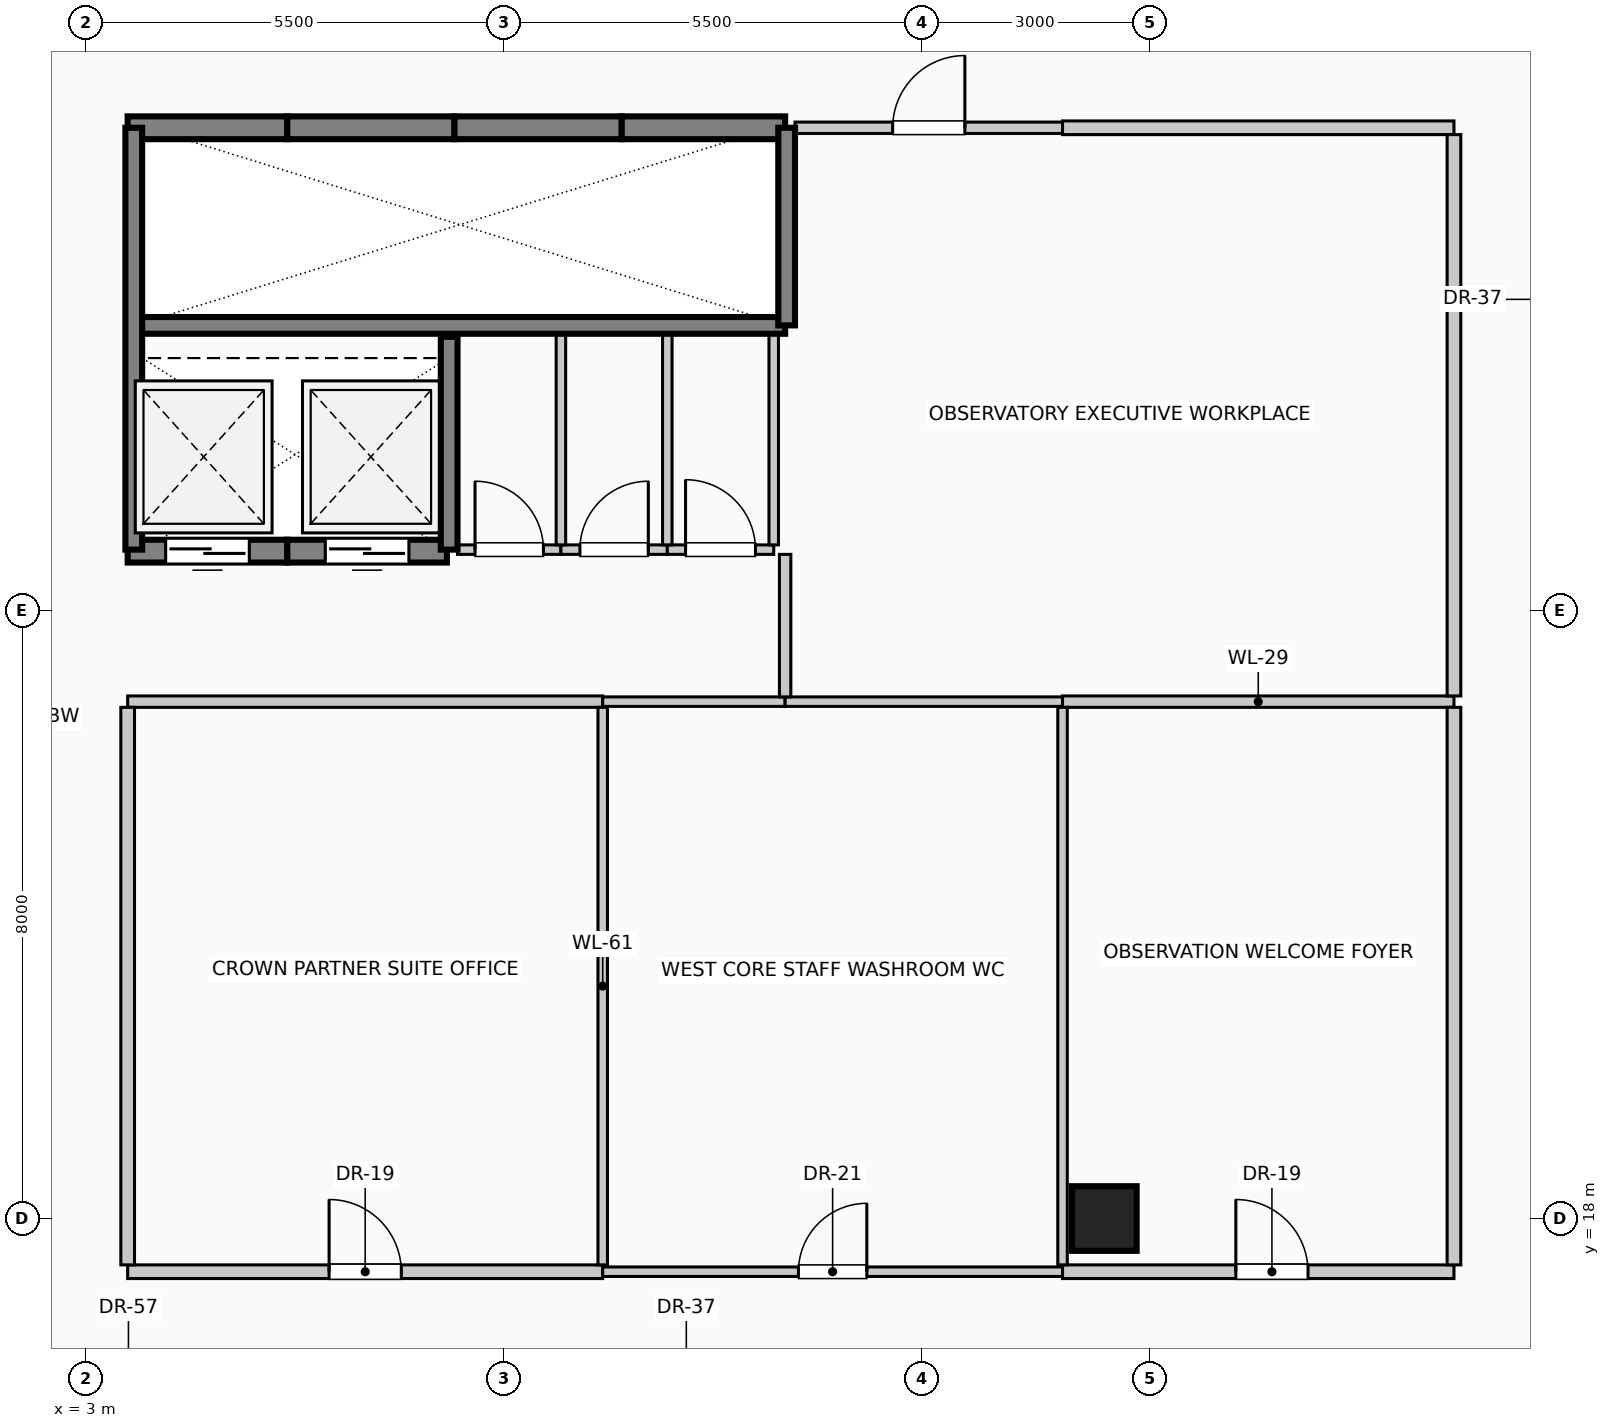
"""IFC4 building model, lengths in metres.
Left out: names, types, materials, properties, quantities, classifications, styles, units other than length and angle.
Written with IfcOpenShell. Run it as: python <this file> out.ifc"""

import sys

from ifc_helpers import new_model, si_unit, direction, frame, frame_2d, origin, origin_2d, place, context, subcontext, project, spatial, rectangle, circle, extrude, element, fill, save


model = new_model("IFC4")
c1 = context("Model", 3, precision=1e-05, world=origin(), true_north=direction((0.0, 1.0)))
c2 = subcontext(c1, "Body", "Model", "MODEL_VIEW")
j1 = project(units=[si_unit("LENGTHUNIT", "METRE"), si_unit("PLANEANGLEUNIT", "RADIAN")], contexts=[c1])
p1 = place(None, origin())
s1 = spatial("IfcSite", under=j1, at=p1, CompositionType="ELEMENT")
p2 = place(p1, origin())
s2 = spatial("IfcBuilding", under=s1, at=p2, CompositionType="ELEMENT")
p3 = place(p2, frame((0.0, 0.0, 313.0)))
s3 = spatial("IfcBuildingStorey", under=s2, at=p3, CompositionType="ELEMENT", Elevation=313.0)
p4 = place(p3, frame((16.4, 18.0, 0.0), z_axis=(0.0, 0.0, 1.0), x_axis=(1.0, 0.0, 0.0)))
e1 = element("IfcColumn", 1, at=p4, inside=s3, PredefinedType="COLUMN", context=c2, shape_type="SweptSolid", body=[
    extrude(circle(Radius=0.425, at=origin_2d()), origin(), (0.0, 0.0, 1.0), 4.8),
])
p5 = place(p3, frame((3.55, 32.35, 0.0), z_axis=(0.0, 0.0, 1.0), x_axis=(1.0, 0.0, 0.0)))
e2 = element("IfcWall", 2, at=p5, inside=s3, PredefinedType="SOLIDWALL", context=c2, shape_type="SweptSolid", body=[
    extrude(rectangle(XDim=2.1, YDim=0.3, at=frame_2d((1.05, 0.0))), origin(), (0.0, 0.0, 1.0), 4.8),
])
p6 = place(p3, frame((5.65, 32.35, 0.0), z_axis=(0.0, 0.0, 1.0), x_axis=(1.0, 0.0, 0.0)))
e3 = element("IfcWall", 3, at=p6, inside=s3, PredefinedType="SOLIDWALL", context=c2, shape_type="SweptSolid", body=[
    extrude(rectangle(XDim=2.2, YDim=0.3, at=frame_2d((1.1, 0.0))), origin(), (0.0, 0.0, 1.0), 4.8),
])
p7 = place(p3, frame((7.85, 32.35, 0.0), z_axis=(0.0, 0.0, 1.0), x_axis=(1.0, 0.0, 0.0)))
e4 = element("IfcWall", 4, at=p7, inside=s3, PredefinedType="SOLIDWALL", context=c2, shape_type="SweptSolid", body=[
    extrude(rectangle(XDim=2.2, YDim=0.3, at=frame_2d((1.1, 0.0))), origin(), (0.0, 0.0, 1.0), 4.8),
])
p8 = place(p3, frame((10.05, 32.35, 0.0), z_axis=(0.0, 0.0, 1.0), x_axis=(1.0, 0.0, 0.0)))
e5 = element("IfcWall", 5, at=p8, inside=s3, PredefinedType="SOLIDWALL", context=c2, shape_type="SweptSolid", body=[
    extrude(rectangle(XDim=2.15, YDim=0.3, at=frame_2d((1.075, 0.0))), origin(), (0.0, 0.0, 1.0), 4.8),
])
p9 = place(p3, frame((5.65, 26.78, 0.0), z_axis=(0.0, 0.0, 1.0), x_axis=(-1.0, 0.0, 0.0)))
e6 = element("IfcWall", 6, at=p9, inside=s3, PredefinedType="SOLIDWALL", context=c2, shape_type="SweptSolid", body=[
    extrude(rectangle(XDim=2.1, YDim=0.3, at=frame_2d((1.05, 0.0))), origin(), (0.0, 0.0, 1.0), 4.8),
])
p10 = place(p9, frame((0.5, 0.0, 0.0)))
e7 = element("IfcOpeningElement", 7, at=p10, cuts=e6, PredefinedType="OPENING", context=c2, shape_type="SweptSolid", body=[
    extrude(rectangle(XDim=1.1, YDim=2.2, at=frame_2d((0.55, 1.1))), frame((0.0, 0.16, 0.0), z_axis=(0.0, -1.0, 0.0), x_axis=(1.0, 0.0, 0.0)), (0.0, 0.0, 1.0), 0.32),
])
p11 = place(p3, frame((7.75, 26.78, 0.0), z_axis=(0.0, 0.0, 1.0), x_axis=(-1.0, 0.0, 0.0)))
e8 = element("IfcWall", 8, at=p11, inside=s3, PredefinedType="SOLIDWALL", context=c2, shape_type="SweptSolid", body=[
    extrude(rectangle(XDim=2.1, YDim=0.3, at=frame_2d((1.05, 0.0))), origin(), (0.0, 0.0, 1.0), 4.8),
])
p12 = place(p11, frame((0.5, 0.0, 0.0)))
e9 = element("IfcOpeningElement", 9, at=p12, cuts=e8, PredefinedType="OPENING", context=c2, shape_type="SweptSolid", body=[
    extrude(rectangle(XDim=1.1, YDim=2.2, at=frame_2d((0.55, 1.1))), frame((0.0, 0.16, 0.0), z_axis=(0.0, -1.0, 0.0), x_axis=(1.0, 0.0, 0.0)), (0.0, 0.0, 1.0), 0.32),
])
p13 = place(p3, frame((3.55, 29.75, 0.0), z_axis=(0.0, 0.0, 1.0), x_axis=(1.0, 0.0, 0.0)))
e10 = element("IfcWall", 10, at=p13, inside=s3, PredefinedType="SOLIDWALL", context=c2, shape_type="SweptSolid", body=[
    extrude(rectangle(XDim=8.65, YDim=0.22, at=frame_2d((4.325, 0.0))), origin(), (0.0, 0.0, 1.0), 4.8),
])
p14 = place(p3, frame((3.63, 26.8, 0.0), z_axis=(0.0, 0.0, 1.0), x_axis=(0.0, 1.0, 0.0)))
e11 = element("IfcWall", 11, at=p14, inside=s3, PredefinedType="SOLIDWALL", context=c2, shape_type="SweptSolid", body=[
    extrude(rectangle(XDim=5.55, YDim=0.22, at=frame_2d((2.775, 0.0))), origin(), (0.0, 0.0, 1.0), 4.8),
])
p15 = place(p3, frame((7.78, 26.8, 0.0), z_axis=(0.0, 0.0, 1.0), x_axis=(0.0, 1.0, 0.0)))
e12 = element("IfcWall", 12, at=p15, inside=s3, PredefinedType="SOLIDWALL", context=c2, shape_type="SweptSolid", body=[
    extrude(rectangle(XDim=2.8, YDim=0.22, at=frame_2d((1.4, 0.0))), origin(), (0.0, 0.0, 1.0), 4.8),
])
p16 = place(p3, frame((12.22, 29.75, 0.0), z_axis=(0.0, 0.0, 1.0), x_axis=(0.0, 1.0, 0.0)))
e13 = element("IfcWall", 13, at=p16, inside=s3, PredefinedType="SOLIDWALL", context=c2, shape_type="SweptSolid", body=[
    extrude(rectangle(XDim=2.6, YDim=0.22, at=frame_2d((1.3, 0.0))), origin(), (0.0, 0.0, 1.0), 4.8),
])
p17 = place(p3, frame((3.55, 17.3, 0.0), z_axis=(0.0, 0.0, 1.0), x_axis=(1.0, 0.0, 0.0)))
e14 = element("IfcWall", 14, at=p17, inside=s3, PredefinedType="PARTITIONING", context=c2, shape_type="SweptSolid", body=[
    extrude(rectangle(XDim=6.25, YDim=0.18, at=frame_2d((3.125, 0.0))), origin(), (0.0, 0.0, 1.0), 4.46),
])
p18 = place(p17, frame((2.65, 0.0, 0.0)))
e15 = element("IfcOpeningElement", 15, at=p18, cuts=e14, PredefinedType="OPENING", context=c2, shape_type="SweptSolid", body=[
    extrude(rectangle(XDim=0.95, YDim=2.15, at=frame_2d((0.475, 1.075))), frame((0.0, 0.1, 0.0), z_axis=(0.0, -1.0, 0.0), x_axis=(1.0, 0.0, 0.0)), (0.0, 0.0, 1.0), 0.2),
])
p19 = place(p3, frame((9.8, 17.3, 0.0), z_axis=(0.0, 0.0, 1.0), x_axis=(1.0, 0.0, 0.0)))
e16 = element("IfcWall", 16, at=p19, inside=s3, PredefinedType="PARTITIONING", context=c2, shape_type="SweptSolid", body=[
    extrude(rectangle(XDim=6.05, YDim=0.125, at=frame_2d((3.025, 0.0))), origin(), (0.0, 0.0, 1.0), 4.46),
])
p20 = place(p19, frame((2.575, 0.0, 0.0)))
e17 = element("IfcOpeningElement", 17, at=p20, cuts=e16, PredefinedType="OPENING", context=c2, shape_type="SweptSolid", body=[
    extrude(rectangle(XDim=0.9, YDim=2.1, at=frame_2d((0.45, 1.05))), frame((0.0, 0.073, 0.0), z_axis=(0.0, -1.0, 0.0), x_axis=(1.0, 0.0, 0.0)), (0.0, 0.0, 1.0), 0.145),
])
p21 = place(p3, frame((15.85, 17.3, 0.0), z_axis=(0.0, 0.0, 1.0), x_axis=(1.0, 0.0, 0.0)))
e18 = element("IfcWall", 18, at=p21, inside=s3, PredefinedType="PARTITIONING", context=c2, shape_type="SweptSolid", body=[
    extrude(rectangle(XDim=5.15, YDim=0.18, at=frame_2d((2.575, 0.0))), origin(), (0.0, 0.0, 1.0), 2.855),
])
p22 = place(p21, frame((2.28, 0.0, 0.0)))
e19 = element("IfcOpeningElement", 19, at=p22, cuts=e18, PredefinedType="OPENING", context=c2, shape_type="SweptSolid", body=[
    extrude(rectangle(XDim=0.95, YDim=2.15, at=frame_2d((0.475, 1.075))), frame((0.0, 0.1, 0.0), z_axis=(0.0, -1.0, 0.0), x_axis=(1.0, 0.0, 0.0)), (0.0, 0.0, 1.0), 0.2),
])
p23 = place(p3, frame((3.55, 24.8, 0.0), z_axis=(0.0, 0.0, 1.0), x_axis=(1.0, 0.0, 0.0)))
e20 = element("IfcWall", 20, at=p23, inside=s3, PredefinedType="PARTITIONING", context=c2, shape_type="SweptSolid", body=[
    extrude(rectangle(XDim=6.25, YDim=0.15, at=frame_2d((3.125, 0.0))), origin(), (0.0, 0.0, 1.0), 4.46),
])
p24 = place(p3, frame((9.8, 24.8, 0.0), z_axis=(0.0, 0.0, 1.0), x_axis=(1.0, 0.0, 0.0)))
e21 = element("IfcWall", 21, at=p24, inside=s3, PredefinedType="PARTITIONING", context=c2, shape_type="SweptSolid", body=[
    extrude(rectangle(XDim=2.4, YDim=0.125, at=frame_2d((1.2, 0.0))), origin(), (0.0, 0.0, 1.0), 4.46),
])
p25 = place(p3, frame((12.2, 24.8, 0.0), z_axis=(0.0, 0.0, 1.0), x_axis=(1.0, 0.0, 0.0)))
e22 = element("IfcWall", 22, at=p25, inside=s3, PredefinedType="PARTITIONING", context=c2, shape_type="SweptSolid", body=[
    extrude(rectangle(XDim=3.65, YDim=0.125, at=frame_2d((1.825, 0.0))), origin(), (0.0, 0.0, 1.0), 4.46),
])
p26 = place(p3, frame((15.85, 24.8, 0.0), z_axis=(0.0, 0.0, 1.0), x_axis=(1.0, 0.0, 0.0)))
e23 = element("IfcWall", 23, at=p26, inside=s3, PredefinedType="PARTITIONING", context=c2, shape_type="SweptSolid", body=[
    extrude(rectangle(XDim=5.15, YDim=0.15, at=frame_2d((2.575, 0.0))), origin(), (0.0, 0.0, 1.0), 4.46),
])
p27 = place(p3, frame((7.89, 26.8, 0.0), z_axis=(0.0, 0.0, 1.0), x_axis=(1.0, 0.0, 0.0)))
e24 = element("IfcWall", 24, at=p27, inside=s3, PredefinedType="PARTITIONING", context=c2, shape_type="SweptSolid", body=[
    extrude(rectangle(XDim=1.36, YDim=0.125, at=frame_2d((0.68, 0.0))), origin(), (0.0, 0.0, 1.0), 4.46),
])
p28 = place(p27, frame((0.23, 0.0, 0.0)))
e25 = element("IfcOpeningElement", 25, at=p28, cuts=e24, PredefinedType="OPENING", context=c2, shape_type="SweptSolid", body=[
    extrude(rectangle(XDim=0.9, YDim=2.1, at=frame_2d((0.45, 1.05))), frame((0.0, 0.073, 0.0), z_axis=(0.0, -1.0, 0.0), x_axis=(1.0, 0.0, 0.0)), (0.0, 0.0, 1.0), 0.145),
])
p29 = place(p3, frame((9.25, 26.8, 0.0), z_axis=(0.0, 0.0, 1.0), x_axis=(1.0, 0.0, 0.0)))
e26 = element("IfcWall", 26, at=p29, inside=s3, PredefinedType="PARTITIONING", context=c2, shape_type="SweptSolid", body=[
    extrude(rectangle(XDim=1.4, YDim=0.125, at=frame_2d((0.7, 0.0))), origin(), (0.0, 0.0, 1.0), 4.46),
])
p30 = place(p29, frame((0.25, 0.0, 0.0)))
e27 = element("IfcOpeningElement", 27, at=p30, cuts=e26, PredefinedType="OPENING", context=c2, shape_type="SweptSolid", body=[
    extrude(rectangle(XDim=0.9, YDim=2.1, at=frame_2d((0.45, 1.05))), frame((0.0, 0.073, 0.0), z_axis=(0.0, -1.0, 0.0), x_axis=(1.0, 0.0, 0.0)), (0.0, 0.0, 1.0), 0.145),
])
p31 = place(p3, frame((10.65, 26.8, 0.0), z_axis=(0.0, 0.0, 1.0), x_axis=(1.0, 0.0, 0.0)))
e28 = element("IfcWall", 28, at=p31, inside=s3, PredefinedType="PARTITIONING", context=c2, shape_type="SweptSolid", body=[
    extrude(rectangle(XDim=1.4, YDim=0.125, at=frame_2d((0.7, 0.0))), origin(), (0.0, 0.0, 1.0), 4.46),
])
p32 = place(p31, frame((0.24, 0.0, 0.0)))
e29 = element("IfcOpeningElement", 29, at=p32, cuts=e28, PredefinedType="OPENING", context=c2, shape_type="SweptSolid", body=[
    extrude(rectangle(XDim=0.92, YDim=2.1, at=frame_2d((0.46, 1.05))), frame((0.0, 0.073, 0.0), z_axis=(0.0, -1.0, 0.0), x_axis=(1.0, 0.0, 0.0)), (0.0, 0.0, 1.0), 0.145),
])
p33 = place(p3, frame((12.33, 32.35, 0.0), z_axis=(0.0, 0.0, 1.0), x_axis=(1.0, 0.0, 0.0)))
e30 = element("IfcWall", 30, at=p33, inside=s3, PredefinedType="PARTITIONING", context=c2, shape_type="SweptSolid", body=[
    extrude(rectangle(XDim=3.52, YDim=0.15, at=frame_2d((1.76, 0.0))), origin(), (0.0, 0.0, 1.0), 4.46),
])
p34 = place(p33, frame((1.285, 0.0, 0.0)))
e31 = element("IfcOpeningElement", 31, at=p34, cuts=e30, PredefinedType="OPENING", context=c2, shape_type="SweptSolid", body=[
    extrude(rectangle(XDim=0.95, YDim=2.15, at=frame_2d((0.475, 1.075))), frame((0.0, 0.085, 0.0), z_axis=(0.0, -1.0, 0.0), x_axis=(1.0, 0.0, 0.0)), (0.0, 0.0, 1.0), 0.17),
])
p35 = place(p3, frame((15.85, 32.35, 0.0), z_axis=(0.0, 0.0, 1.0), x_axis=(1.0, 0.0, 0.0)))
e32 = element("IfcWall", 32, at=p35, inside=s3, PredefinedType="PARTITIONING", context=c2, shape_type="SweptSolid", body=[
    extrude(rectangle(XDim=5.15, YDim=0.18, at=frame_2d((2.575, 0.0))), origin(), (0.0, 0.0, 1.0), 4.46),
])
p36 = place(p3, frame((3.55, 17.39, 0.0), z_axis=(0.0, 0.0, 1.0), x_axis=(0.0, 1.0, 0.0)))
e33 = element("IfcWall", 33, at=p36, inside=s3, PredefinedType="PARTITIONING", context=c2, shape_type="SweptSolid", body=[
    extrude(rectangle(XDim=7.335, YDim=0.18, at=frame_2d((3.667, 0.0))), origin(), (0.0, 0.0, 1.0), 4.46),
])
p37 = place(p3, frame((9.25, 26.863, 0.0), z_axis=(0.0, 0.0, 1.0), x_axis=(0.0, 1.0, 0.0)))
e34 = element("IfcWall", 34, at=p37, inside=s3, PredefinedType="PARTITIONING", context=c2, shape_type="SweptSolid", body=[
    extrude(rectangle(XDim=2.777, YDim=0.125, at=frame_2d((1.389, 0.0))), origin(), (0.0, 0.0, 1.0), 4.46),
])
p38 = place(p3, frame((9.8, 17.39, 0.0), z_axis=(0.0, 0.0, 1.0), x_axis=(0.0, 1.0, 0.0)))
e35 = element("IfcWall", 35, at=p38, inside=s3, PredefinedType="PARTITIONING", context=c2, shape_type="SweptSolid", body=[
    extrude(rectangle(XDim=7.335, YDim=0.125, at=frame_2d((3.667, 0.0))), origin(), (0.0, 0.0, 1.0), 4.46),
])
for number, where, z_axis, x_axis in (
    (36, (10.65, 26.863, 0.0), (0.0, 0.0, 1.0), (0.0, 1.0, 0.0)),
    (37, (12.05, 26.863, 0.0), (0.0, 0.0, 1.0), (0.0, 1.0, 0.0)),
):
    element("IfcWall", number, at=place(p3, frame(where, z_axis=z_axis, x_axis=x_axis)), inside=s3, PredefinedType="PARTITIONING", context=c2, shape_type="SweptSolid", body=[
        extrude(rectangle(XDim=2.777, YDim=0.125, at=frame_2d((1.389, 0.0))), origin(), (0.0, 0.0, 1.0), 4.46),
    ])
p39 = place(p3, frame((12.2, 24.863, 0.0), z_axis=(0.0, 0.0, 1.0), x_axis=(0.0, 1.0, 0.0)))
e38 = element("IfcWall", 38, at=p39, inside=s3, PredefinedType="PARTITIONING", context=c2, shape_type="SweptSolid", body=[
    extrude(rectangle(XDim=1.875, YDim=0.15, at=frame_2d((0.938, 0.0))), origin(), (0.0, 0.0, 1.0), 4.46),
])
p40 = place(p3, frame((15.85, 17.39, 0.0), z_axis=(0.0, 0.0, 1.0), x_axis=(0.0, 1.0, 0.0)))
e39 = element("IfcWall", 39, at=p40, inside=s3, PredefinedType="PARTITIONING", context=c2, shape_type="SweptSolid", body=[
    extrude(rectangle(XDim=7.335, YDim=0.125, at=frame_2d((3.667, 0.0))), origin(), (0.0, 0.0, 1.0), 4.46),
])
p41 = place(p3, frame((21.0, 17.39, 0.0), z_axis=(0.0, 0.0, 1.0), x_axis=(0.0, 1.0, 0.0)))
e40 = element("IfcWall", 40, at=p41, inside=s3, PredefinedType="PARTITIONING", context=c2, shape_type="SweptSolid", body=[
    extrude(rectangle(XDim=7.335, YDim=0.18, at=frame_2d((3.667, 0.0))), origin(), (0.0, 0.0, 1.0), 4.46),
])
p42 = place(p3, frame((21.0, 24.875, 0.0), z_axis=(0.0, 0.0, 1.0), x_axis=(0.0, 1.0, 0.0)))
e41 = element("IfcWall", 41, at=p42, inside=s3, PredefinedType="PARTITIONING", context=c2, shape_type="SweptSolid", body=[
    extrude(rectangle(XDim=7.385, YDim=0.18, at=frame_2d((3.692, 0.0))), origin(), (0.0, 0.0, 1.0), 4.46),
])
p43 = place(p10, origin())
e42 = element("IfcDoor", 42, at=p43, inside=s3, OperationType="SLIDING_TO_LEFT", PredefinedType="DOOR", context=c2, shape_type="SweptSolid", body=[
    extrude(rectangle(XDim=1.1, YDim=2.2, at=frame_2d((0.55, 1.1))), frame((0.0, 0.025, 0.0), z_axis=(0.0, -1.0, 0.0), x_axis=(1.0, 0.0, 0.0)), (0.0, 0.0, 1.0), 0.05),
])
fill(e7, e42)
p44 = place(p12, origin())
e43 = element("IfcDoor", 43, at=p44, inside=s3, OperationType="SLIDING_TO_RIGHT", PredefinedType="DOOR", context=c2, shape_type="SweptSolid", body=[
    extrude(rectangle(XDim=1.1, YDim=2.2, at=frame_2d((0.55, 1.1))), frame((0.0, 0.025, 0.0), z_axis=(0.0, -1.0, 0.0), x_axis=(1.0, 0.0, 0.0)), (0.0, 0.0, 1.0), 0.05),
])
fill(e9, e43)
p45 = place(p18, origin())
e44 = element("IfcDoor", 44, at=p45, inside=s3, OperationType="SINGLE_SWING_LEFT", PredefinedType="DOOR", context=c2, shape_type="SweptSolid", body=[
    extrude(rectangle(XDim=0.95, YDim=2.15, at=frame_2d((0.475, 1.075))), frame((0.0, 0.025, 0.0), z_axis=(0.0, -1.0, 0.0), x_axis=(1.0, 0.0, 0.0)), (0.0, 0.0, 1.0), 0.05),
])
fill(e15, e44)
p46 = place(p20, origin())
e45 = element("IfcDoor", 45, at=p46, inside=s3, OperationType="SINGLE_SWING_RIGHT", PredefinedType="DOOR", context=c2, shape_type="SweptSolid", body=[
    extrude(rectangle(XDim=0.9, YDim=2.1, at=frame_2d((0.45, 1.05))), frame((0.0, 0.025, 0.0), z_axis=(0.0, -1.0, 0.0), x_axis=(1.0, 0.0, 0.0)), (0.0, 0.0, 1.0), 0.05),
])
fill(e17, e45)
p47 = place(p22, origin())
e46 = element("IfcDoor", 46, at=p47, inside=s3, OperationType="SINGLE_SWING_LEFT", PredefinedType="DOOR", context=c2, shape_type="SweptSolid", body=[
    extrude(rectangle(XDim=0.95, YDim=2.15, at=frame_2d((0.475, 1.075))), frame((0.0, 0.025, 0.0), z_axis=(0.0, -1.0, 0.0), x_axis=(1.0, 0.0, 0.0)), (0.0, 0.0, 1.0), 0.05),
])
fill(e19, e46)
p48 = place(p28, origin())
e47 = element("IfcDoor", 47, at=p48, inside=s3, OperationType="SINGLE_SWING_LEFT", PredefinedType="DOOR", context=c2, shape_type="SweptSolid", body=[
    extrude(rectangle(XDim=0.9, YDim=2.1, at=frame_2d((0.45, 1.05))), frame((0.0, 0.025, 0.0), z_axis=(0.0, -1.0, 0.0), x_axis=(1.0, 0.0, 0.0)), (0.0, 0.0, 1.0), 0.05),
])
fill(e25, e47)
p49 = place(p30, origin())
e48 = element("IfcDoor", 48, at=p49, inside=s3, OperationType="SINGLE_SWING_RIGHT", PredefinedType="DOOR", context=c2, shape_type="SweptSolid", body=[
    extrude(rectangle(XDim=0.9, YDim=2.1, at=frame_2d((0.45, 1.05))), frame((0.0, 0.025, 0.0), z_axis=(0.0, -1.0, 0.0), x_axis=(1.0, 0.0, 0.0)), (0.0, 0.0, 1.0), 0.05),
])
fill(e27, e48)
p50 = place(p32, origin())
e49 = element("IfcDoor", 49, at=p50, inside=s3, OperationType="SINGLE_SWING_LEFT", PredefinedType="DOOR", context=c2, shape_type="SweptSolid", body=[
    extrude(rectangle(XDim=0.92, YDim=2.1, at=frame_2d((0.46, 1.05))), frame((0.0, 0.025, 0.0), z_axis=(0.0, -1.0, 0.0), x_axis=(1.0, 0.0, 0.0)), (0.0, 0.0, 1.0), 0.05),
])
fill(e29, e49)
p51 = place(p34, origin())
e50 = element("IfcDoor", 50, at=p51, inside=s3, OperationType="SINGLE_SWING_RIGHT", PredefinedType="DOOR", context=c2, shape_type="SweptSolid", body=[
    extrude(rectangle(XDim=0.95, YDim=2.15, at=frame_2d((0.475, 1.075))), frame((0.0, 0.025, 0.0), z_axis=(0.0, -1.0, 0.0), x_axis=(1.0, 0.0, 0.0)), (0.0, 0.0, 1.0), 0.05),
])
fill(e31, e50)
save(model, sys.argv[1])
